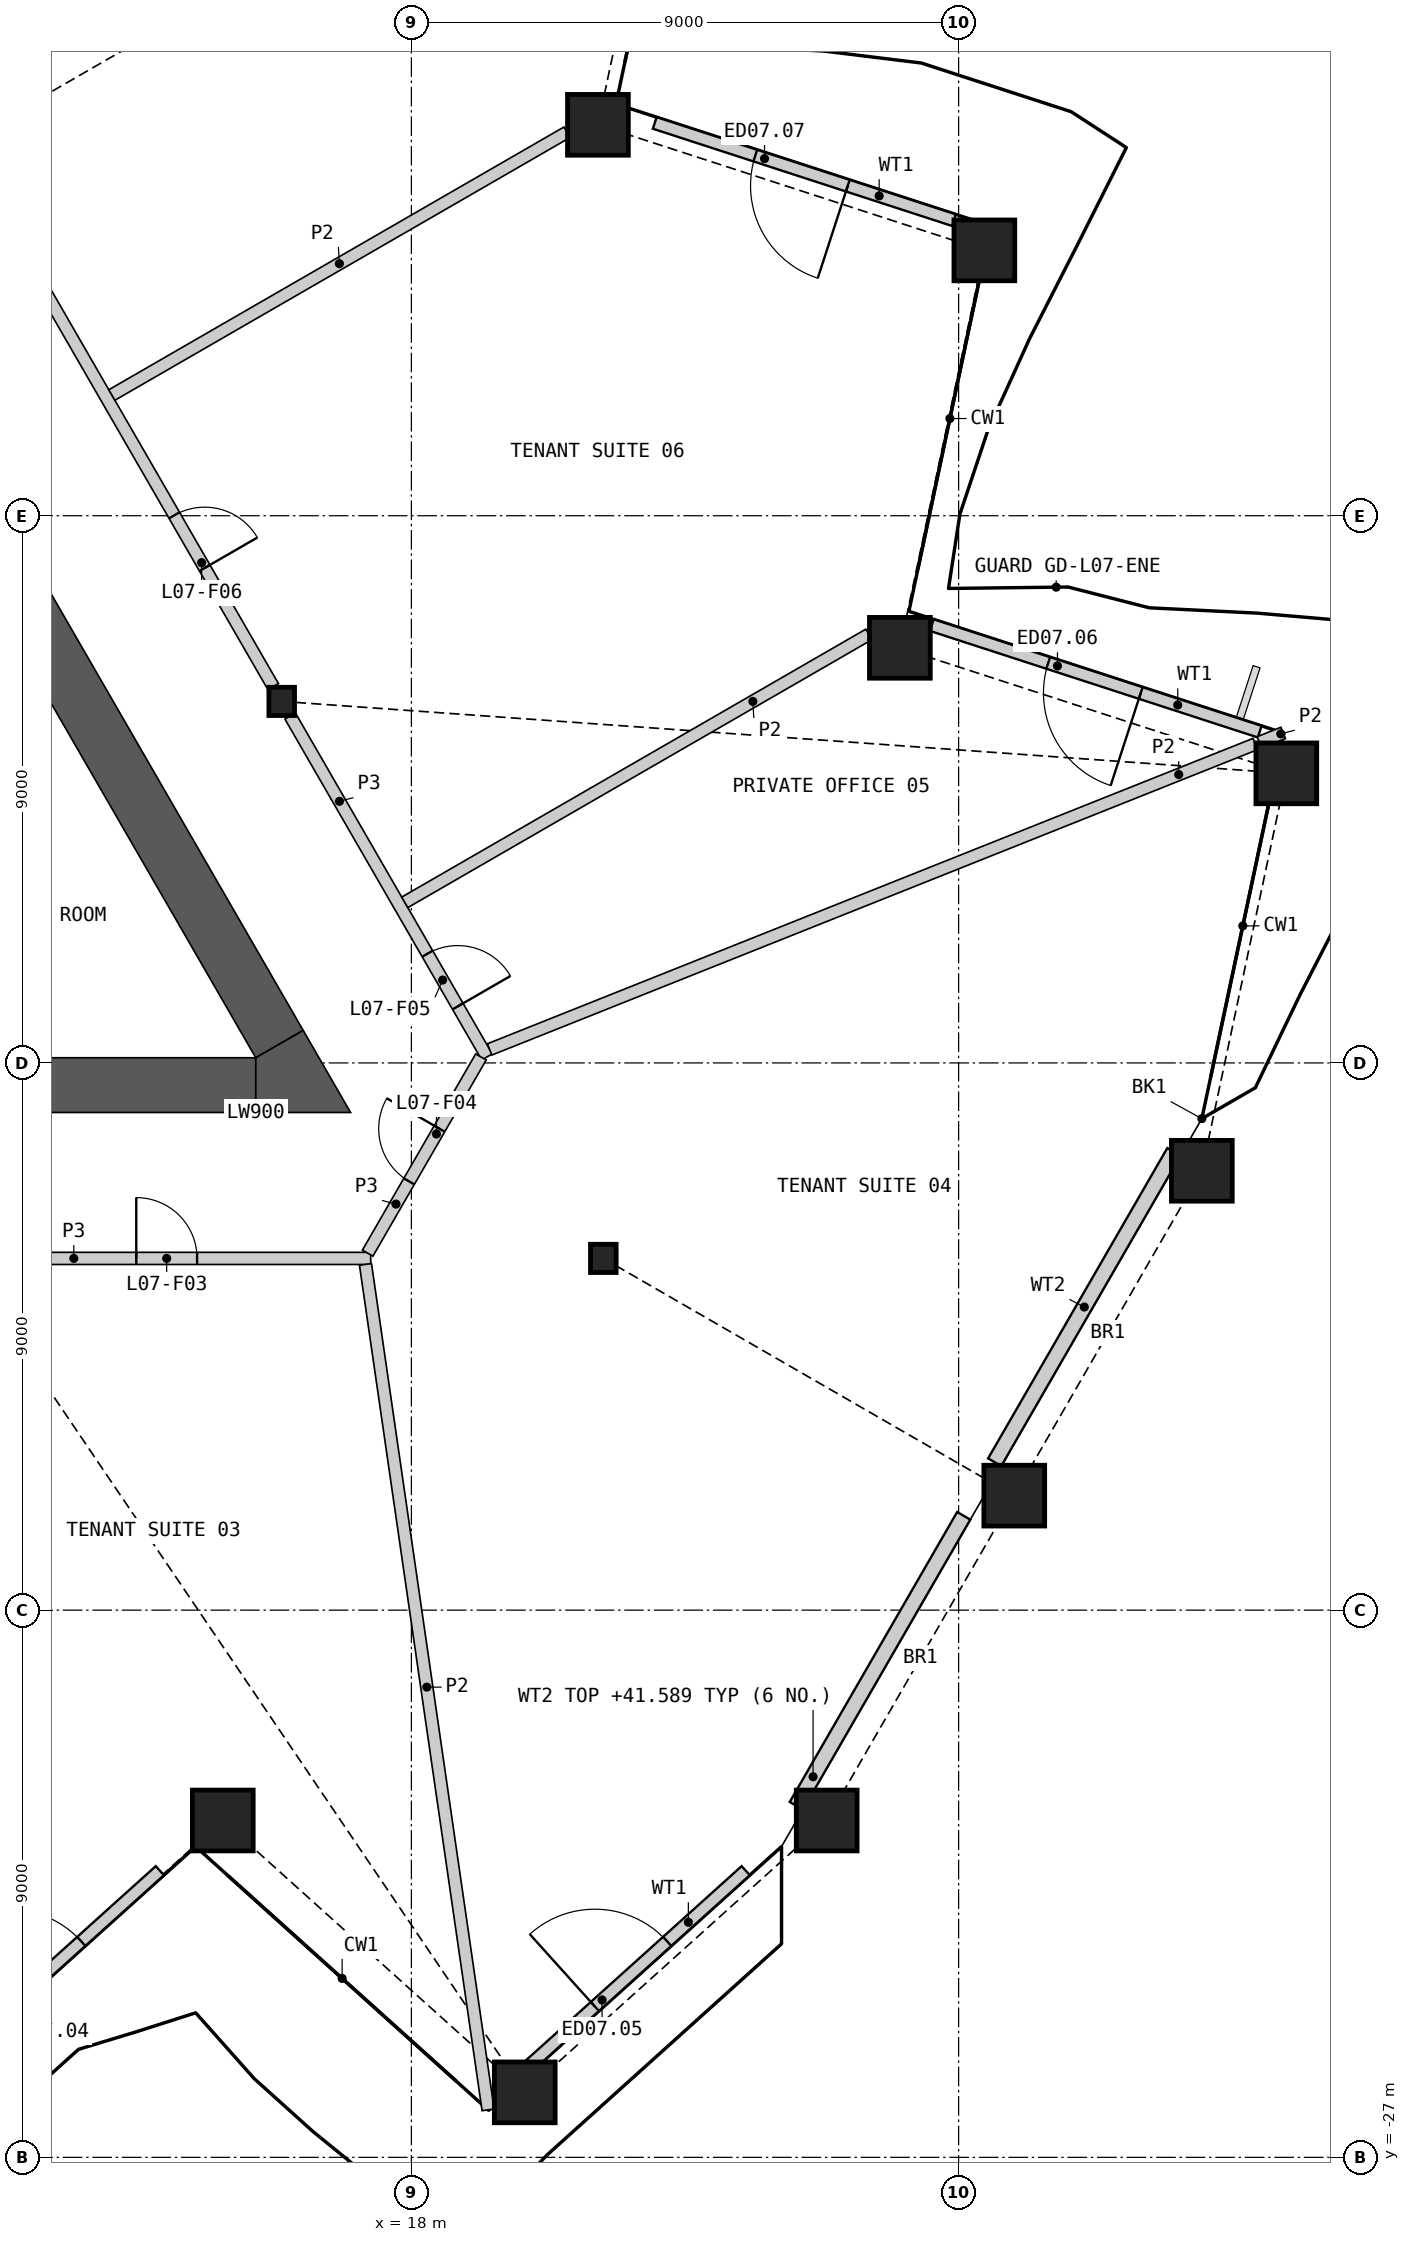
"""IFC4 building model, lengths in metres.
Left out: names, types, materials, properties, quantities, classifications, styles, units other than length and angle.
Written with IfcOpenShell. Run it as: python <this file> out.ifc"""

import sys

from ifc_helpers import new_model, si_unit, direction, frame, frame_2d, origin, origin_2d, place, context, subcontext, project, spatial, polyline, rectangle, hollow_rectangle, i_section, outline, extrude, element, fill, save


model = new_model("IFC4")
c1 = context("Model", 3, precision=1e-05, world=origin(), true_north=direction((0.0, 1.0)))
c2 = subcontext(c1, "Body", "Model", "MODEL_VIEW")
j1 = project(units=[si_unit("LENGTHUNIT", "METRE"), si_unit("PLANEANGLEUNIT", "RADIAN")], contexts=[c1])
p1 = place(None, origin())
s1 = spatial("IfcSite", under=j1, at=p1, CompositionType="ELEMENT")
p2 = place(p1, origin())
s2 = spatial("IfcBuilding", under=s1, at=p2, CompositionType="ELEMENT")
p3 = place(p2, frame((0.0, 0.0, 38.4)))
s3 = spatial("IfcBuildingStorey", under=s2, at=p3, CompositionType="ELEMENT", Elevation=38.4)
for number, where, z_axis, x_axis in (
    (1, (14.898, -21.46, 0.0), (0.0, 0.0, 1.0), (1.0, 0.0, 0.0)),
    (2, (19.864, -25.931, 0.0), (0.0, 0.0, 1.0), (1.0, 0.0, 0.0)),
    (3, (24.83, -21.46, 0.0), (0.0, 0.0, 1.0), (1.0, 0.0, 0.0)),
    (4, (27.915, -16.117, 0.0), (0.0, 0.0, 1.0), (1.0, 0.0, 0.0)),
    (5, (31.0, -10.774, 0.0), (0.0, 0.0, 1.0), (1.0, 0.0, 0.0)),
    (6, (32.389, -4.237, 0.0), (0.0, 0.0, 1.0), (1.0, 0.0, 0.0)),
    (7, (26.034, -2.172, 0.0), (0.0, 0.0, 1.0), (1.0, 0.0, 0.0)),
    (8, (27.423, 4.364, 0.0), (0.0, 0.0, 1.0), (1.0, 0.0, 0.0)),
    (9, (21.068, 6.429, 0.0), (0.0, 0.0, 1.0), (1.0, 0.0, 0.0)),
):
    element("IfcColumn", number, at=place(p3, frame(where, z_axis=z_axis, x_axis=x_axis)), inside=s3, PredefinedType="COLUMN", context=c2, shape_type="SweptSolid", body=[
        extrude(hollow_rectangle(XDim=1.0, YDim=1.0, WallThickness=0.07, at=origin_2d()), origin(), (0.0, 0.0, 1.0), 4.2),
    ])
for number, where, z_axis, x_axis in (
    (10, (21.157, -12.215, 0.0), (0.0, 0.0, 1.0), (1.0, 0.0, 0.0)),
    (11, (15.868, -3.054, 0.0), (0.0, 0.0, 1.0), (1.0, 0.0, 0.0)),
):
    element("IfcColumn", number, at=place(p3, frame(where, z_axis=z_axis, x_axis=x_axis)), inside=s3, PredefinedType="COLUMN", context=c2, shape_type="SweptSolid", body=[
        extrude(i_section(OverallWidth=0.421, OverallDepth=0.465, WebThickness=0.045, FlangeThickness=0.072, at=origin_2d()), origin(), (0.0, 0.0, 1.0), 4.2),
    ])
p4 = place(p3, frame((10.091, -25.682, 0.0), z_axis=(0.0, 0.0, 1.0), x_axis=(0.74314347906, 0.669132101704, 0.0)))
e12 = element("IfcWall", 12, at=p4, inside=s3, PredefinedType="SOLIDWALL", context=c2, shape_type="SweptSolid", body=[
    extrude(rectangle(XDim=5.077, YDim=0.2, at=frame_2d((2.538, 0.0))), origin(), (0.0, 0.0, 1.0), 3.189),
])
p5 = place(p4, frame((1.738, 0.0, 0.0)))
e13 = element("IfcOpeningElement", 13, at=p5, cuts=e12, PredefinedType="OPENING", context=c2, shape_type="SweptSolid", body=[
    extrude(rectangle(XDim=1.6, YDim=2.4, at=frame_2d((0.8, 1.2))), frame((0.0, 0.11, 0.0), z_axis=(0.0, -1.0, 0.0), x_axis=(1.0, 0.0, 0.0)), (0.0, 0.0, 1.0), 0.22),
])
p6 = place(p3, frame((19.726, -25.682, 0.0), z_axis=(0.0, 0.0, 1.0), x_axis=(0.74314347906, 0.669132101704, 0.0)))
e14 = element("IfcWall", 14, at=p6, inside=s3, PredefinedType="SOLIDWALL", context=c2, shape_type="SweptSolid", body=[
    extrude(rectangle(XDim=5.077, YDim=0.2, at=frame_2d((2.538, 0.0))), origin(), (0.0, 0.0, 1.0), 3.189),
])
p7 = place(p6, frame((1.738, 0.0, 0.0)))
e15 = element("IfcOpeningElement", 15, at=p7, cuts=e14, PredefinedType="OPENING", context=c2, shape_type="SweptSolid", body=[
    extrude(rectangle(XDim=1.6, YDim=2.4, at=frame_2d((0.8, 1.2))), frame((0.0, 0.11, 0.0), z_axis=(0.0, -1.0, 0.0), x_axis=(1.0, 0.0, 0.0)), (0.0, 0.0, 1.0), 0.22),
])
p8 = place(p3, frame((24.331, -21.217, 0.0), z_axis=(0.0, 0.0, 1.0), x_axis=(0.500006469283, 0.86602166871, 0.0)))
e16 = element("IfcWall", 16, at=p8, inside=s3, PredefinedType="SOLIDWALL", context=c2, shape_type="SweptSolid", body=[
    extrude(rectangle(XDim=5.506, YDim=0.25, at=frame_2d((2.753, 0.0))), origin(), (0.0, 0.0, 1.0), 3.189),
])
p9 = place(p3, frame((27.593, -15.567, 0.0), z_axis=(0.0, 0.0, 1.0), x_axis=(0.500010498135, 0.866019342599, 0.0)))
e17 = element("IfcWall", 17, at=p9, inside=s3, PredefinedType="SOLIDWALL", context=c2, shape_type="SweptSolid", body=[
    extrude(rectangle(XDim=5.894, YDim=0.25, at=frame_2d((2.947, 0.0))), origin(), (0.0, 0.0, 1.0), 3.189),
])
p10 = place(p3, frame((31.952, -3.552, 0.0), z_axis=(0.0, 0.0, 1.0), x_axis=(-0.951049886998, 0.309037396509, 0.0)))
e18 = element("IfcWall", 18, at=p10, inside=s3, PredefinedType="SOLIDWALL", context=c2, shape_type="SweptSolid", body=[
    extrude(rectangle(XDim=5.671, YDim=0.2, at=frame_2d((2.835, 0.0))), origin(), (0.0, 0.0, 1.0), 3.189),
])
p11 = place(p10, frame((2.057, 0.0, 0.0)))
e19 = element("IfcOpeningElement", 19, at=p11, cuts=e18, PredefinedType="OPENING", context=c2, shape_type="SweptSolid", body=[
    extrude(rectangle(XDim=1.6, YDim=2.4, at=frame_2d((0.8, 1.2))), frame((0.0, 0.11, 0.0), z_axis=(0.0, -1.0, 0.0), x_axis=(1.0, 0.0, 0.0)), (0.0, 0.0, 1.0), 0.22),
])
p12 = place(p3, frame((26.923, 4.861, 0.0), z_axis=(0.0, 0.0, 1.0), x_axis=(-0.951053139094, 0.309027388138, 0.0)))
e20 = element("IfcWall", 20, at=p12, inside=s3, PredefinedType="SOLIDWALL", context=c2, shape_type="SweptSolid", body=[
    extrude(rectangle(XDim=5.174, YDim=0.2, at=frame_2d((2.587, 0.0))), origin(), (0.0, 0.0, 1.0), 3.189),
])
p13 = place(p12, frame((1.836, 0.0, 0.0)))
e21 = element("IfcOpeningElement", 21, at=p13, cuts=e20, PredefinedType="OPENING", context=c2, shape_type="SweptSolid", body=[
    extrude(rectangle(XDim=1.6, YDim=2.4, at=frame_2d((0.8, 1.2))), frame((0.0, 0.11, 0.0), z_axis=(0.0, -1.0, 0.0), x_axis=(1.0, 0.0, 0.0)), (0.0, 0.0, 1.0), 0.22),
])
p14 = place(p3, frame((6.571, -9.365, 0.0), z_axis=(0.0, 0.0, 1.0), x_axis=(1.0, 0.0, 0.0)))
e22 = element("IfcWall", 22, at=p14, inside=s3, PredefinedType="SHEAR", context=c2, shape_type="SweptSolid", body=[
    extrude(rectangle(XDim=8.871, YDim=0.9, at=frame_2d((4.435, 0.0))), origin(), (0.0, 0.0, 1.0), 3.8),
])
p15 = place(p3, frame((15.831, -8.69, 0.0), z_axis=(0.0, 0.0, 1.0), x_axis=(-0.499997452939, 0.866026874326, 0.0)))
e23 = element("IfcWall", 23, at=p15, inside=s3, PredefinedType="SHEAR", context=c2, shape_type="SweptSolid", body=[
    extrude(rectangle(XDim=13.141, YDim=0.9, at=frame_2d((6.571, 0.0))), origin(), (0.0, 0.0, 1.0), 3.8),
])
p16 = place(p3, origin())
e24 = element("IfcWall", 24, at=p16, inside=s3, PredefinedType="SHEAR", context=c2, shape_type="SweptSolid", body=[
    extrude(outline(polyline([(15.441, -9.815), (15.441, -8.915), (16.221, -8.465), (17.0, -9.815), (15.441, -9.815)])), origin(), (0.0, 0.0, 1.0), 3.8),
])
p17 = place(p3, frame((10.719, 5.865, 0.0), z_axis=(0.0, 0.0, 1.0), x_axis=(0.49999175339, -0.866030164915, 0.0)))
e25 = element("IfcWall", 25, at=p17, inside=s3, PredefinedType="PARTITIONING", context=c2, shape_type="SweptSolid", body=[
    extrude(rectangle(XDim=10.019, YDim=0.2, at=frame_2d((5.009, 0.0))), origin(), (0.0, 0.0, 1.0), 3.8),
])
p18 = place(p17, frame((6.764, 0.0, 0.0)))
e26 = element("IfcOpeningElement", 26, at=p18, cuts=e25, PredefinedType="OPENING", context=c2, shape_type="SweptSolid", body=[
    extrude(rectangle(XDim=1.0, YDim=2.1, at=frame_2d((0.5, 1.05))), frame((0.0, 0.11, 0.0), z_axis=(0.0, -1.0, 0.0), x_axis=(1.0, 0.0, 0.0)), (0.0, 0.0, 1.0), 0.22),
])
p19 = place(p3, frame((10.821, -12.215, 0.0), z_axis=(0.0, 0.0, 1.0), x_axis=(1.0, 0.0, 0.0)))
e27 = element("IfcWall", 27, at=p19, inside=s3, PredefinedType="PARTITIONING", context=c2, shape_type="SweptSolid", body=[
    extrude(rectangle(XDim=6.51, YDim=0.2, at=frame_2d((3.255, 0.0))), origin(), (0.0, 0.0, 1.0), 3.8),
])
p20 = place(p19, frame((2.655, 0.0, 0.0)))
e28 = element("IfcOpeningElement", 28, at=p20, cuts=e27, PredefinedType="OPENING", context=c2, shape_type="SweptSolid", body=[
    extrude(rectangle(XDim=1.0, YDim=2.1, at=frame_2d((0.5, 1.05))), frame((0.0, 0.11, 0.0), z_axis=(0.0, -1.0, 0.0), x_axis=(1.0, 0.0, 0.0)), (0.0, 0.0, 1.0), 0.22),
])
p21 = place(p3, frame((16.008, -3.296, 0.0), z_axis=(0.0, 0.0, 1.0), x_axis=(0.499984737558, -0.86603421538, 0.0)))
e29 = element("IfcWall", 29, at=p21, inside=s3, PredefinedType="PARTITIONING", context=c2, shape_type="SweptSolid", body=[
    extrude(rectangle(XDim=6.473, YDim=0.2, at=frame_2d((3.236, 0.0))), origin(), (0.0, 0.0, 1.0), 3.8),
])
p22 = place(p21, frame((4.512, 0.0, 0.0)))
e30 = element("IfcOpeningElement", 30, at=p22, cuts=e29, PredefinedType="OPENING", context=c2, shape_type="SweptSolid", body=[
    extrude(rectangle(XDim=1.0, YDim=2.1, at=frame_2d((0.5, 1.05))), frame((0.0, 0.11, 0.0), z_axis=(0.0, -1.0, 0.0), x_axis=(1.0, 0.0, 0.0)), (0.0, 0.0, 1.0), 0.22),
])
p23 = place(p3, frame((17.281, -12.128, 0.0), z_axis=(0.0, 0.0, 1.0), x_axis=(0.499958791762, 0.866049194065, 0.0)))
e31 = element("IfcWall", 31, at=p23, inside=s3, PredefinedType="PARTITIONING", context=c2, shape_type="SweptSolid", body=[
    extrude(rectangle(XDim=3.726, YDim=0.2, at=frame_2d((1.863, 0.0))), origin(), (0.0, 0.0, 1.0), 3.8),
])
p24 = place(p23, frame((1.363, 0.0, 0.0)))
e32 = element("IfcOpeningElement", 32, at=p24, cuts=e31, PredefinedType="OPENING", context=c2, shape_type="SweptSolid", body=[
    extrude(rectangle(XDim=1.0, YDim=2.1, at=frame_2d((0.5, 1.05))), frame((0.0, 0.11, 0.0), z_axis=(0.0, -1.0, 0.0), x_axis=(1.0, 0.0, 0.0)), (0.0, 0.0, 1.0), 0.22),
])
p25 = place(p3, frame((17.245, -12.314, 0.0), z_axis=(0.0, 0.0, 1.0), x_axis=(0.143525263071, -0.989646653539, 0.0)))
e33 = element("IfcWall", 33, at=p25, inside=s3, PredefinedType="PARTITIONING", context=c2, shape_type="SweptSolid", body=[
    extrude(rectangle(XDim=14.051, YDim=0.2, at=frame_2d((7.025, 0.0))), origin(), (0.0, 0.0, 1.0), 2.885),
])
p26 = place(p3, frame((19.287, -8.778, 0.0), z_axis=(0.0, 0.0, 1.0), x_axis=(0.928821541656, 0.370527385973, 0.0)))
e34 = element("IfcWall", 34, at=p26, inside=s3, PredefinedType="PARTITIONING", context=c2, shape_type="SweptSolid", body=[
    extrude(rectangle(XDim=13.558, YDim=0.2, at=frame_2d((6.779, 0.0))), origin(), (0.0, 0.0, 1.0), 2.885),
])
p27 = place(p3, frame((17.891, -6.359, 0.0), z_axis=(0.0, 0.0, 1.0), x_axis=(0.866021822855, 0.500006202301, 0.0)))
e35 = element("IfcWall", 35, at=p27, inside=s3, PredefinedType="PARTITIONING", context=c2, shape_type="SweptSolid", body=[
    extrude(rectangle(XDim=8.813, YDim=0.2, at=frame_2d((4.407, 0.0))), origin(), (0.0, 0.0, 1.0), 2.885),
])
p28 = place(p3, frame((13.074, 1.985, 0.0), z_axis=(0.0, 0.0, 1.0), x_axis=(0.86602139752, 0.500006938989, 0.0)))
e36 = element("IfcWall", 36, at=p28, inside=s3, PredefinedType="PARTITIONING", context=c2, shape_type="SweptSolid", body=[
    extrude(rectangle(XDim=8.642, YDim=0.2, at=frame_2d((4.321, 0.0))), origin(), (0.0, 0.0, 1.0), 2.885),
])
p29 = place(p3, frame((31.948, -3.727, 0.0), z_axis=(0.0, 0.0, 1.0), x_axis=(0.928757356094, 0.370688243003, 0.0)))
e37 = element("IfcWall", 37, at=p29, inside=s3, PredefinedType="PARTITIONING", context=c2, shape_type="SweptSolid", body=[
    extrude(rectangle(XDim=0.419, YDim=0.2, at=frame_2d((0.21, 0.0))), origin(), (0.0, 0.0, 1.0), 2.885),
])
p30 = place(p5, origin())
e38 = element("IfcDoor", 38, at=p30, inside=s3, OperationType="DOUBLE_DOOR_SINGLE_SWING", PredefinedType="DOOR", context=c2, shape_type="SweptSolid", body=[
    extrude(rectangle(XDim=1.6, YDim=2.4, at=frame_2d((0.8, 1.2))), frame((0.0, 0.025, 0.0), z_axis=(0.0, -1.0, 0.0), x_axis=(1.0, 0.0, 0.0)), (0.0, 0.0, 1.0), 0.05),
])
fill(e13, e38)
p31 = place(p7, origin())
e39 = element("IfcDoor", 39, at=p31, inside=s3, OperationType="DOUBLE_DOOR_SINGLE_SWING", PredefinedType="DOOR", context=c2, shape_type="SweptSolid", body=[
    extrude(rectangle(XDim=1.6, YDim=2.4, at=frame_2d((0.8, 1.2))), frame((0.0, 0.025, 0.0), z_axis=(0.0, -1.0, 0.0), x_axis=(1.0, 0.0, 0.0)), (0.0, 0.0, 1.0), 0.05),
])
fill(e15, e39)
p32 = place(p11, origin())
e40 = element("IfcDoor", 40, at=p32, inside=s3, OperationType="DOUBLE_DOOR_SINGLE_SWING", PredefinedType="DOOR", context=c2, shape_type="SweptSolid", body=[
    extrude(rectangle(XDim=1.6, YDim=2.4, at=frame_2d((0.8, 1.2))), frame((0.0, 0.025, 0.0), z_axis=(0.0, -1.0, 0.0), x_axis=(1.0, 0.0, 0.0)), (0.0, 0.0, 1.0), 0.05),
])
fill(e19, e40)
p33 = place(p13, origin())
e41 = element("IfcDoor", 41, at=p33, inside=s3, OperationType="DOUBLE_DOOR_SINGLE_SWING", PredefinedType="DOOR", context=c2, shape_type="SweptSolid", body=[
    extrude(rectangle(XDim=1.6, YDim=2.4, at=frame_2d((0.8, 1.2))), frame((0.0, 0.025, 0.0), z_axis=(0.0, -1.0, 0.0), x_axis=(1.0, 0.0, 0.0)), (0.0, 0.0, 1.0), 0.05),
])
fill(e21, e41)
p34 = place(p20, origin())
e42 = element("IfcDoor", 42, at=p34, inside=s3, OperationType="SINGLE_SWING_LEFT", PredefinedType="DOOR", context=c2, shape_type="SweptSolid", body=[
    extrude(rectangle(XDim=1.0, YDim=2.1, at=frame_2d((0.5, 1.05))), frame((0.0, 0.025, 0.0), z_axis=(0.0, -1.0, 0.0), x_axis=(1.0, 0.0, 0.0)), (0.0, 0.0, 1.0), 0.05),
])
fill(e28, e42)
p35 = place(p24, origin())
e43 = element("IfcDoor", 43, at=p35, inside=s3, OperationType="SINGLE_SWING_RIGHT", PredefinedType="DOOR", context=c2, shape_type="SweptSolid", body=[
    extrude(rectangle(XDim=1.0, YDim=2.1, at=frame_2d((0.5, 1.05))), frame((0.0, 0.025, 0.0), z_axis=(0.0, -1.0, 0.0), x_axis=(1.0, 0.0, 0.0)), (0.0, 0.0, 1.0), 0.05),
])
fill(e32, e43)
p36 = place(p22, origin())
e44 = element("IfcDoor", 44, at=p36, inside=s3, OperationType="SINGLE_SWING_RIGHT", PredefinedType="DOOR", context=c2, shape_type="SweptSolid", body=[
    extrude(rectangle(XDim=1.0, YDim=2.1, at=frame_2d((0.5, 1.05))), frame((0.0, 0.025, 0.0), z_axis=(0.0, -1.0, 0.0), x_axis=(1.0, 0.0, 0.0)), (0.0, 0.0, 1.0), 0.05),
])
fill(e30, e44)
p37 = place(p18, origin())
e45 = element("IfcDoor", 45, at=p37, inside=s3, OperationType="SINGLE_SWING_RIGHT", PredefinedType="DOOR", context=c2, shape_type="SweptSolid", body=[
    extrude(rectangle(XDim=1.0, YDim=2.1, at=frame_2d((0.5, 1.05))), frame((0.0, 0.025, 0.0), z_axis=(0.0, -1.0, 0.0), x_axis=(1.0, 0.0, 0.0)), (0.0, 0.0, 1.0), 0.05),
])
fill(e26, e45)
save(model, sys.argv[1])
